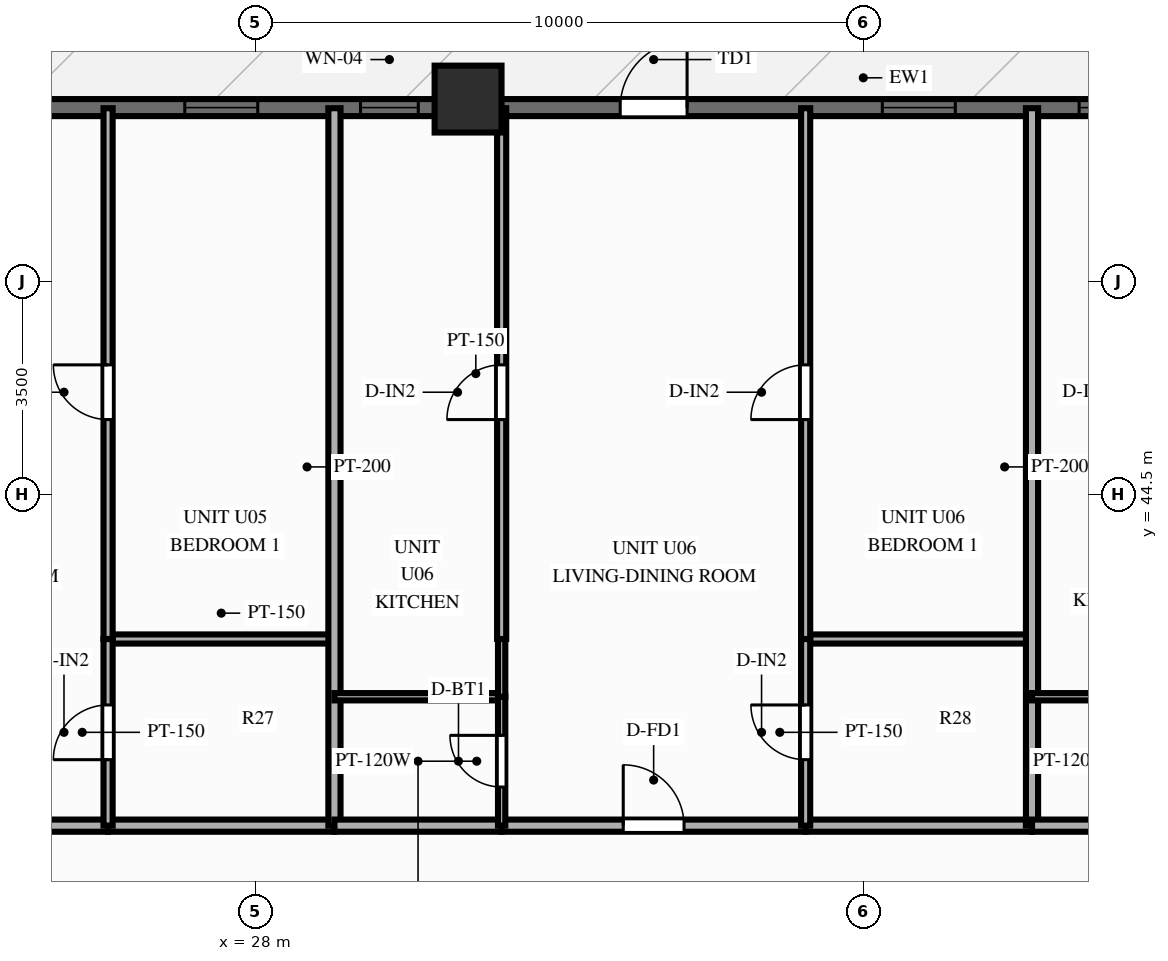
"""IFC4 building model, lengths in metres.
Left out: names, types, materials, properties, quantities, classifications, styles, units other than length and angle.
Written with IfcOpenShell. Run it as: python <this file> out.ifc"""

import sys

from ifc_helpers import new_model, si_unit, direction, frame, frame_2d, origin, origin_2d, place, context, subcontext, project, spatial, rectangle, extrude, source, transform, mapped, element, fill, save


model = new_model("IFC4")
c1 = context("Model", 3, precision=1e-05, world=origin(), true_north=direction((0.0, 1.0)))
c2 = subcontext(c1, "Body", "Model", "MODEL_VIEW")
j1 = project(units=[si_unit("LENGTHUNIT", "METRE"), si_unit("PLANEANGLEUNIT", "RADIAN")], contexts=[c1])
p1 = place(None, origin())
s1 = spatial("IfcSite", under=j1, at=p1, CompositionType="ELEMENT")
p2 = place(p1, origin())
s2 = spatial("IfcBuilding", under=s1, at=p2, CompositionType="ELEMENT")
p3 = place(p2, frame((0.0, 0.0, 43.4)))
s3 = spatial("IfcBuildingStorey", under=s2, at=p3, CompositionType="ELEMENT", Elevation=43.4)
m1 = source(origin(), c2, "Body", "SweptSolid", [
    extrude(rectangle(XDim=1.1, YDim=1.1, at=origin_2d()), origin(), (0.0, 0.0, 1.0), 3.0),
])
p4 = place(p3, frame((31.5, 51.0, 0.0), z_axis=(0.0, 0.0, 1.0), x_axis=(1.0, 0.0, 0.0)))
e1 = element("IfcColumn", 1, at=p4, inside=s3, PredefinedType="COLUMN", context=c2, shape_type="MappedRepresentation", body=[
    mapped(m1, transform((0.0, 0.0, 0.0), scale=1.0)),
])
p5 = place(p3, frame((15.5, 50.86, 0.0), z_axis=(0.0, 0.0, 1.0), x_axis=(1.0, 0.0, 0.0)))
e2 = element("IfcWall", 2, at=p5, inside=s3, PredefinedType="SOLIDWALL", context=c2, shape_type="SweptSolid", body=[
    extrude(rectangle(XDim=45.0, YDim=0.28, at=frame_2d((22.5, 0.0))), origin(), (0.0, 0.0, 1.0), 2.28),
])
p6 = place(p5, frame((0.76, 0.0, 0.25)))
e3 = element("IfcOpeningElement", 3, at=p6, cuts=e2, PredefinedType="OPENING", context=c2, shape_type="SweptSolid", body=[
    extrude(rectangle(XDim=1.2, YDim=1.5, at=frame_2d((0.6, 0.75))), frame((0.0, 0.152, 0.0), z_axis=(0.0, -1.0, 0.0), x_axis=(1.0, 0.0, 0.0)), (0.0, 0.0, 1.0), 0.304),
])
p7 = place(p5, frame((3.105, 0.0, 0.25)))
e4 = element("IfcOpeningElement", 4, at=p7, cuts=e2, PredefinedType="OPENING", context=c2, shape_type="SweptSolid", body=[
    extrude(rectangle(XDim=1.2, YDim=1.5, at=frame_2d((0.6, 0.75))), frame((0.0, 0.152, 0.0), z_axis=(0.0, -1.0, 0.0), x_axis=(1.0, 0.0, 0.0)), (0.0, 0.0, 1.0), 0.304),
])
p8 = place(p5, frame((6.98, 0.0, 0.25)))
e5 = element("IfcOpeningElement", 5, at=p8, cuts=e2, PredefinedType="OPENING", context=c2, shape_type="SweptSolid", body=[
    extrude(rectangle(XDim=1.2, YDim=1.5, at=frame_2d((0.6, 0.75))), frame((0.0, 0.152, 0.0), z_axis=(0.0, -1.0, 0.0), x_axis=(1.0, 0.0, 0.0)), (0.0, 0.0, 1.0), 0.304),
])
p9 = place(p5, frame((11.341, 0.0, 0.25)))
e6 = element("IfcOpeningElement", 6, at=p9, cuts=e2, PredefinedType="OPENING", context=c2, shape_type="SweptSolid", body=[
    extrude(rectangle(XDim=1.2, YDim=1.5, at=frame_2d((0.6, 0.75))), frame((0.0, 0.152, 0.0), z_axis=(0.0, -1.0, 0.0), x_axis=(1.0, 0.0, 0.0)), (0.0, 0.0, 1.0), 0.304),
])
p10 = place(p5, frame((14.231, 0.0, 0.25)))
e7 = element("IfcOpeningElement", 7, at=p10, cuts=e2, PredefinedType="OPENING", context=c2, shape_type="SweptSolid", body=[
    extrude(rectangle(XDim=0.95, YDim=1.5, at=frame_2d((0.475, 0.75))), frame((0.0, 0.152, 0.0), z_axis=(0.0, -1.0, 0.0), x_axis=(1.0, 0.0, 0.0)), (0.0, 0.0, 1.0), 0.304),
])
p11 = place(p5, frame((18.502, 0.0, 0.0)))
e8 = element("IfcOpeningElement", 8, at=p11, cuts=e2, PredefinedType="OPENING", context=c2, shape_type="SweptSolid", body=[
    extrude(rectangle(XDim=1.1, YDim=2.15, at=frame_2d((0.55, 1.075))), frame((0.0, 0.152, 0.0), z_axis=(0.0, -1.0, 0.0), x_axis=(1.0, 0.0, 0.0)), (0.0, 0.0, 1.0), 0.304),
])
p12 = place(p5, frame((22.813, 0.0, 0.25)))
e9 = element("IfcOpeningElement", 9, at=p12, cuts=e2, PredefinedType="OPENING", context=c2, shape_type="SweptSolid", body=[
    extrude(rectangle(XDim=1.2, YDim=1.5, at=frame_2d((0.6, 0.75))), frame((0.0, 0.152, 0.0), z_axis=(0.0, -1.0, 0.0), x_axis=(1.0, 0.0, 0.0)), (0.0, 0.0, 1.0), 0.304),
])
p13 = place(p5, frame((26.05, 0.0, 0.25)))
e10 = element("IfcOpeningElement", 10, at=p13, cuts=e2, PredefinedType="OPENING", context=c2, shape_type="SweptSolid", body=[
    extrude(rectangle(XDim=1.2, YDim=1.5, at=frame_2d((0.6, 0.75))), frame((0.0, 0.152, 0.0), z_axis=(0.0, -1.0, 0.0), x_axis=(1.0, 0.0, 0.0)), (0.0, 0.0, 1.0), 0.304),
])
p14 = place(p5, frame((29.97, 0.0, 0.25)))
e11 = element("IfcOpeningElement", 11, at=p14, cuts=e2, PredefinedType="OPENING", context=c2, shape_type="SweptSolid", body=[
    extrude(rectangle(XDim=1.2, YDim=1.5, at=frame_2d((0.6, 0.75))), frame((0.0, 0.152, 0.0), z_axis=(0.0, -1.0, 0.0), x_axis=(1.0, 0.0, 0.0)), (0.0, 0.0, 1.0), 0.304),
])
p15 = place(p5, frame((33.011, 0.0, 0.25)))
e12 = element("IfcOpeningElement", 12, at=p15, cuts=e2, PredefinedType="OPENING", context=c2, shape_type="SweptSolid", body=[
    extrude(rectangle(XDim=1.2, YDim=1.5, at=frame_2d((0.6, 0.75))), frame((0.0, 0.152, 0.0), z_axis=(0.0, -1.0, 0.0), x_axis=(1.0, 0.0, 0.0)), (0.0, 0.0, 1.0), 0.304),
])
p16 = place(p5, frame((36.181, 0.0, 0.25)))
e13 = element("IfcOpeningElement", 13, at=p16, cuts=e2, PredefinedType="OPENING", context=c2, shape_type="SweptSolid", body=[
    extrude(rectangle(XDim=1.2, YDim=1.5, at=frame_2d((0.6, 0.75))), frame((0.0, 0.152, 0.0), z_axis=(0.0, -1.0, 0.0), x_axis=(1.0, 0.0, 0.0)), (0.0, 0.0, 1.0), 0.304),
])
p17 = place(p5, frame((39.079, 0.0, 0.25)))
e14 = element("IfcOpeningElement", 14, at=p17, cuts=e2, PredefinedType="OPENING", context=c2, shape_type="SweptSolid", body=[
    extrude(rectangle(XDim=1.2, YDim=1.5, at=frame_2d((0.6, 0.75))), frame((0.0, 0.152, 0.0), z_axis=(0.0, -1.0, 0.0), x_axis=(1.0, 0.0, 0.0)), (0.0, 0.0, 1.0), 0.304),
])
p18 = place(p5, frame((42.339, 0.0, 0.25)))
e15 = element("IfcOpeningElement", 15, at=p18, cuts=e2, PredefinedType="OPENING", context=c2, shape_type="SweptSolid", body=[
    extrude(rectangle(XDim=1.2, YDim=1.5, at=frame_2d((0.6, 0.75))), frame((0.0, 0.152, 0.0), z_axis=(0.0, -1.0, 0.0), x_axis=(1.0, 0.0, 0.0)), (0.0, 0.0, 1.0), 0.304),
])
p19 = place(p3, frame((20.58, 39.05, 0.0), z_axis=(0.0, 0.0, 1.0), x_axis=(1.0, 0.0, 0.0)))
e16 = element("IfcWall", 16, at=p19, inside=s3, PredefinedType="PARTITIONING", context=c2, shape_type="SweptSolid", body=[
    extrude(rectangle(XDim=5.0, YDim=0.2, at=frame_2d((2.5, 0.0))), origin(), (0.0, 0.0, 1.0), 2.79),
])
p20 = place(p19, frame((2.0, 0.0, 0.0)))
e17 = element("IfcOpeningElement", 17, at=p20, cuts=e16, PredefinedType="OPENING", context=c2, shape_type="SweptSolid", body=[
    extrude(rectangle(XDim=1.0, YDim=2.15, at=frame_2d((0.5, 1.075))), frame((0.0, 0.112, 0.0), z_axis=(0.0, -1.0, 0.0), x_axis=(1.0, 0.0, 0.0)), (0.0, 0.0, 1.0), 0.224),
])
p21 = place(p3, frame((25.58, 39.05, 0.0), z_axis=(0.0, 0.0, 1.0), x_axis=(1.0, 0.0, 0.0)))
e18 = element("IfcWall", 18, at=p21, inside=s3, PredefinedType="PARTITIONING", context=c2, shape_type="SweptSolid", body=[
    extrude(rectangle(XDim=3.723, YDim=0.2, at=frame_2d((1.861, 0.0))), origin(), (0.0, 0.0, 1.0), 2.79),
])
p22 = place(p3, frame((25.58, 42.12, 0.0), z_axis=(0.0, 0.0, 1.0), x_axis=(1.0, 0.0, 0.0)))
e19 = element("IfcWall", 19, at=p22, inside=s3, PredefinedType="PARTITIONING", context=c2, shape_type="SweptSolid", body=[
    extrude(rectangle(XDim=3.723, YDim=0.15, at=frame_2d((1.861, 0.0))), origin(), (0.0, 0.0, 1.0), 2.79),
])
p23 = place(p3, frame((25.58, 39.05, 0.0), z_axis=(0.0, 0.0, 1.0), x_axis=(0.0, 1.0, 0.0)))
e20 = element("IfcWall", 20, at=p23, inside=s3, PredefinedType="PARTITIONING", context=c2, shape_type="SweptSolid", body=[
    extrude(rectangle(XDim=3.07, YDim=0.15, at=frame_2d((1.535, 0.0))), origin(), (0.0, 0.0, 1.0), 2.79),
])
p24 = place(p23, frame((1.085, 0.0, 0.0)))
e21 = element("IfcOpeningElement", 21, at=p24, cuts=e20, PredefinedType="OPENING", context=c2, shape_type="SweptSolid", body=[
    extrude(rectangle(XDim=0.9, YDim=2.1, at=frame_2d((0.45, 1.05))), frame((0.0, 0.087, 0.0), z_axis=(0.0, -1.0, 0.0), x_axis=(1.0, 0.0, 0.0)), (0.0, 0.0, 1.0), 0.174),
])
p25 = place(p3, frame((25.58, 42.12, 0.0), z_axis=(0.0, 0.0, 1.0), x_axis=(0.0, 1.0, 0.0)))
e22 = element("IfcWall", 22, at=p25, inside=s3, PredefinedType="PARTITIONING", context=c2, shape_type="SweptSolid", body=[
    extrude(rectangle(XDim=8.73, YDim=0.15, at=frame_2d((4.365, 0.0))), origin(), (0.0, 0.0, 1.0), 2.79),
])
p26 = place(p25, frame((3.609, 0.0, 0.0)))
e23 = element("IfcOpeningElement", 23, at=p26, cuts=e22, PredefinedType="OPENING", context=c2, shape_type="SweptSolid", body=[
    extrude(rectangle(XDim=0.9, YDim=2.1, at=frame_2d((0.45, 1.05))), frame((0.0, 0.087, 0.0), z_axis=(0.0, -1.0, 0.0), x_axis=(1.0, 0.0, 0.0)), (0.0, 0.0, 1.0), 0.174),
])
p27 = place(p3, frame((29.302, 39.05, 0.0), z_axis=(0.0, 0.0, 1.0), x_axis=(0.0, 1.0, 0.0)))
e24 = element("IfcWall", 24, at=p27, inside=s3, PredefinedType="PARTITIONING", context=c2, shape_type="SweptSolid", body=[
    extrude(rectangle(XDim=11.8, YDim=0.2, at=frame_2d((5.9, 0.0))), origin(), (0.0, 0.0, 1.0), 2.79),
])
p28 = place(p3, frame((29.302, 39.05, 0.0), z_axis=(0.0, 0.0, 1.0), x_axis=(1.0, 0.0, 0.0)))
e25 = element("IfcWall", 25, at=p28, inside=s3, PredefinedType="PARTITIONING", context=c2, shape_type="SweptSolid", body=[
    extrude(rectangle(XDim=2.75, YDim=0.2, at=frame_2d((1.375, 0.0))), origin(), (0.0, 0.0, 1.0), 2.79),
])
p29 = place(p3, frame((32.052, 39.05, 0.0), z_axis=(0.0, 0.0, 1.0), x_axis=(1.0, 0.0, 0.0)))
e26 = element("IfcWall", 26, at=p29, inside=s3, PredefinedType="PARTITIONING", context=c2, shape_type="SweptSolid", body=[
    extrude(rectangle(XDim=5.0, YDim=0.2, at=frame_2d((2.5, 0.0))), origin(), (0.0, 0.0, 1.0), 2.79),
])
p30 = place(p29, frame((2.0, 0.0, 0.0)))
e27 = element("IfcOpeningElement", 27, at=p30, cuts=e26, PredefinedType="OPENING", context=c2, shape_type="SweptSolid", body=[
    extrude(rectangle(XDim=1.0, YDim=2.15, at=frame_2d((0.5, 1.075))), frame((0.0, 0.112, 0.0), z_axis=(0.0, -1.0, 0.0), x_axis=(1.0, 0.0, 0.0)), (0.0, 0.0, 1.0), 0.224),
])
p31 = place(p3, frame((37.052, 39.05, 0.0), z_axis=(0.0, 0.0, 1.0), x_axis=(1.0, 0.0, 0.0)))
e28 = element("IfcWall", 28, at=p31, inside=s3, PredefinedType="PARTITIONING", context=c2, shape_type="SweptSolid", body=[
    extrude(rectangle(XDim=3.723, YDim=0.2, at=frame_2d((1.861, 0.0))), origin(), (0.0, 0.0, 1.0), 2.79),
])
p32 = place(p3, frame((29.302, 41.17, 0.0), z_axis=(0.0, 0.0, 1.0), x_axis=(1.0, 0.0, 0.0)))
e29 = element("IfcWall", 29, at=p32, inside=s3, PredefinedType="PARTITIONING", context=c2, shape_type="SweptSolid", body=[
    extrude(rectangle(XDim=2.75, YDim=0.12, at=frame_2d((1.375, 0.0))), origin(), (0.0, 0.0, 1.0), 2.79),
])
p33 = place(p3, frame((37.052, 42.12, 0.0), z_axis=(0.0, 0.0, 1.0), x_axis=(1.0, 0.0, 0.0)))
e30 = element("IfcWall", 30, at=p33, inside=s3, PredefinedType="PARTITIONING", context=c2, shape_type="SweptSolid", body=[
    extrude(rectangle(XDim=3.723, YDim=0.15, at=frame_2d((1.861, 0.0))), origin(), (0.0, 0.0, 1.0), 2.79),
])
p34 = place(p3, frame((32.052, 39.05, 0.0), z_axis=(0.0, 0.0, 1.0), x_axis=(0.0, 1.0, 0.0)))
e31 = element("IfcWall", 31, at=p34, inside=s3, PredefinedType="PARTITIONING", context=c2, shape_type="SweptSolid", body=[
    extrude(rectangle(XDim=2.12, YDim=0.12, at=frame_2d((1.06, 0.0))), origin(), (0.0, 0.0, 1.0), 2.79),
])
p35 = place(p34, frame((0.635, 0.0, 0.0)))
e32 = element("IfcOpeningElement", 32, at=p35, cuts=e31, PredefinedType="OPENING", context=c2, shape_type="SweptSolid", body=[
    extrude(rectangle(XDim=0.85, YDim=2.05, at=frame_2d((0.425, 1.025))), frame((0.0, 0.072, 0.0), z_axis=(0.0, -1.0, 0.0), x_axis=(1.0, 0.0, 0.0)), (0.0, 0.0, 1.0), 0.144),
])
p36 = place(p3, frame((32.052, 41.17, 0.0), z_axis=(0.0, 0.0, 1.0), x_axis=(0.0, 1.0, 0.0)))
e33 = element("IfcWall", 33, at=p36, inside=s3, PredefinedType="PARTITIONING", context=c2, shape_type="SweptSolid", body=[
    extrude(rectangle(XDim=0.95, YDim=0.12, at=frame_2d((0.475, 0.0))), origin(), (0.0, 0.0, 1.0), 2.79),
])
p37 = place(p3, frame((32.052, 42.12, 0.0), z_axis=(0.0, 0.0, 1.0), x_axis=(0.0, 1.0, 0.0)))
e34 = element("IfcWall", 34, at=p37, inside=s3, PredefinedType="PARTITIONING", context=c2, shape_type="SweptSolid", body=[
    extrude(rectangle(XDim=8.73, YDim=0.15, at=frame_2d((4.365, 0.0))), origin(), (0.0, 0.0, 1.0), 2.79),
])
p38 = place(p37, frame((3.609, 0.0, 0.0)))
e35 = element("IfcOpeningElement", 35, at=p38, cuts=e34, PredefinedType="OPENING", context=c2, shape_type="SweptSolid", body=[
    extrude(rectangle(XDim=0.9, YDim=2.1, at=frame_2d((0.45, 1.05))), frame((0.0, 0.087, 0.0), z_axis=(0.0, -1.0, 0.0), x_axis=(1.0, 0.0, 0.0)), (0.0, 0.0, 1.0), 0.174),
])
p39 = place(p3, frame((37.052, 39.05, 0.0), z_axis=(0.0, 0.0, 1.0), x_axis=(0.0, 1.0, 0.0)))
e36 = element("IfcWall", 36, at=p39, inside=s3, PredefinedType="PARTITIONING", context=c2, shape_type="SweptSolid", body=[
    extrude(rectangle(XDim=3.07, YDim=0.15, at=frame_2d((1.535, 0.0))), origin(), (0.0, 0.0, 1.0), 2.79),
])
p40 = place(p39, frame((1.085, 0.0, 0.0)))
e37 = element("IfcOpeningElement", 37, at=p40, cuts=e36, PredefinedType="OPENING", context=c2, shape_type="SweptSolid", body=[
    extrude(rectangle(XDim=0.9, YDim=2.1, at=frame_2d((0.45, 1.05))), frame((0.0, 0.087, 0.0), z_axis=(0.0, -1.0, 0.0), x_axis=(1.0, 0.0, 0.0)), (0.0, 0.0, 1.0), 0.174),
])
p41 = place(p3, frame((37.052, 42.12, 0.0), z_axis=(0.0, 0.0, 1.0), x_axis=(0.0, 1.0, 0.0)))
e38 = element("IfcWall", 38, at=p41, inside=s3, PredefinedType="PARTITIONING", context=c2, shape_type="SweptSolid", body=[
    extrude(rectangle(XDim=8.73, YDim=0.15, at=frame_2d((4.365, 0.0))), origin(), (0.0, 0.0, 1.0), 2.79),
])
p42 = place(p41, frame((3.609, 0.0, 0.0)))
e39 = element("IfcOpeningElement", 39, at=p42, cuts=e38, PredefinedType="OPENING", context=c2, shape_type="SweptSolid", body=[
    extrude(rectangle(XDim=0.9, YDim=2.1, at=frame_2d((0.45, 1.05))), frame((0.0, 0.087, 0.0), z_axis=(0.0, -1.0, 0.0), x_axis=(1.0, 0.0, 0.0)), (0.0, 0.0, 1.0), 0.174),
])
p43 = place(p3, frame((40.775, 39.05, 0.0), z_axis=(0.0, 0.0, 1.0), x_axis=(0.0, 1.0, 0.0)))
e40 = element("IfcWall", 40, at=p43, inside=s3, PredefinedType="PARTITIONING", context=c2, shape_type="SweptSolid", body=[
    extrude(rectangle(XDim=11.8, YDim=0.2, at=frame_2d((5.9, 0.0))), origin(), (0.0, 0.0, 1.0), 2.79),
])
p44 = place(p3, frame((40.775, 39.05, 0.0), z_axis=(0.0, 0.0, 1.0), x_axis=(1.0, 0.0, 0.0)))
e41 = element("IfcWall", 41, at=p44, inside=s3, PredefinedType="PARTITIONING", context=c2, shape_type="SweptSolid", body=[
    extrude(rectangle(XDim=2.75, YDim=0.2, at=frame_2d((1.375, 0.0))), origin(), (0.0, 0.0, 1.0), 2.79),
])
p45 = place(p3, frame((40.775, 41.17, 0.0), z_axis=(0.0, 0.0, 1.0), x_axis=(1.0, 0.0, 0.0)))
e42 = element("IfcWall", 42, at=p45, inside=s3, PredefinedType="PARTITIONING", context=c2, shape_type="SweptSolid", body=[
    extrude(rectangle(XDim=2.75, YDim=0.12, at=frame_2d((1.375, 0.0))), origin(), (0.0, 0.0, 1.0), 2.79),
])
m2 = source(origin(), c2, "Body", "SweptSolid", [
    extrude(rectangle(XDim=1.2, YDim=1.5, at=frame_2d((0.6, 0.75))), frame((0.0, 0.03, 0.0), z_axis=(0.0, -1.0, 0.0), x_axis=(1.0, 0.0, 0.0)), (0.0, 0.0, 1.0), 0.06),
])
p46 = place(p9, origin())
e43 = element("IfcWindow", 43, at=p46, inside=s3, PartitioningType="SINGLE_PANEL", PredefinedType="WINDOW", context=c2, shape_type="MappedRepresentation", body=[
    mapped(m2, transform((0.0, 0.0, 0.0), scale=1.0)),
])
fill(e6, e43)
m3 = source(origin(), c2, "Body", "SweptSolid", [
    extrude(rectangle(XDim=0.95, YDim=1.5, at=frame_2d((0.475, 0.75))), frame((0.0, 0.03, 0.0), z_axis=(0.0, -1.0, 0.0), x_axis=(1.0, 0.0, 0.0)), (0.0, 0.0, 1.0), 0.06),
])
p47 = place(p10, origin())
e44 = element("IfcWindow", 44, at=p47, inside=s3, PartitioningType="SINGLE_PANEL", PredefinedType="WINDOW", context=c2, shape_type="MappedRepresentation", body=[
    mapped(m3, transform((0.0, 0.0, 0.0), scale=1.0)),
])
fill(e7, e44)
m4 = source(origin(), c2, "Body", "SweptSolid", [
    extrude(rectangle(XDim=1.1, YDim=2.15, at=frame_2d((0.55, 1.075))), frame((0.0, 0.025, 0.0), z_axis=(0.0, -1.0, 0.0), x_axis=(1.0, 0.0, 0.0)), (0.0, 0.0, 1.0), 0.05),
])
p48 = place(p11, origin())
e45 = element("IfcDoor", 45, at=p48, inside=s3, OperationType="SINGLE_SWING_RIGHT", PredefinedType="DOOR", context=c2, shape_type="MappedRepresentation", body=[
    mapped(m4, transform((0.0, 0.0, 0.0), scale=1.0)),
])
fill(e8, e45)
p49 = place(p12, origin())
e46 = element("IfcWindow", 46, at=p49, inside=s3, PartitioningType="SINGLE_PANEL", PredefinedType="WINDOW", context=c2, shape_type="MappedRepresentation", body=[
    mapped(m2, transform((0.0, 0.0, 0.0), scale=1.0)),
])
fill(e9, e46)
p50 = place(p13, origin())
e47 = element("IfcWindow", 47, at=p50, inside=s3, PartitioningType="SINGLE_PANEL", PredefinedType="WINDOW", context=c2, shape_type="MappedRepresentation", body=[
    mapped(m2, transform((0.0, 0.0, 0.0), scale=1.0)),
])
fill(e10, e47)
m5 = source(origin(), c2, "Body", "SweptSolid", [
    extrude(rectangle(XDim=0.9, YDim=2.1, at=frame_2d((0.45, 1.05))), frame((0.0, 0.025, 0.0), z_axis=(0.0, -1.0, 0.0), x_axis=(1.0, 0.0, 0.0)), (0.0, 0.0, 1.0), 0.05),
])
p51 = place(p24, origin())
e48 = element("IfcDoor", 48, at=p51, inside=s3, OperationType="SINGLE_SWING_LEFT", PredefinedType="DOOR", context=c2, shape_type="MappedRepresentation", body=[
    mapped(m5, transform((0.0, 0.0, 0.0), scale=1.0)),
])
fill(e21, e48)
p52 = place(p26, origin())
e49 = element("IfcDoor", 49, at=p52, inside=s3, OperationType="SINGLE_SWING_RIGHT", PredefinedType="DOOR", context=c2, shape_type="MappedRepresentation", body=[
    mapped(m5, transform((0.0, 0.0, 0.0), scale=1.0)),
])
fill(e23, e49)
m6 = source(origin(), c2, "Body", "SweptSolid", [
    extrude(rectangle(XDim=1.0, YDim=2.15, at=frame_2d((0.5, 1.075))), frame((0.0, 0.025, 0.0), z_axis=(0.0, -1.0, 0.0), x_axis=(1.0, 0.0, 0.0)), (0.0, 0.0, 1.0), 0.05),
])
p53 = place(p30, origin())
e50 = element("IfcDoor", 50, at=p53, inside=s3, OperationType="SINGLE_SWING_LEFT", PredefinedType="DOOR", context=c2, shape_type="MappedRepresentation", body=[
    mapped(m6, transform((0.0, 0.0, 0.0), scale=1.0)),
])
fill(e27, e50)
m7 = source(origin(), c2, "Body", "SweptSolid", [
    extrude(rectangle(XDim=0.85, YDim=2.05, at=frame_2d((0.425, 1.025))), frame((0.0, 0.025, 0.0), z_axis=(0.0, -1.0, 0.0), x_axis=(1.0, 0.0, 0.0)), (0.0, 0.0, 1.0), 0.05),
])
p54 = place(p35, origin())
e51 = element("IfcDoor", 51, at=p54, inside=s3, OperationType="SINGLE_SWING_RIGHT", PredefinedType="DOOR", context=c2, shape_type="MappedRepresentation", body=[
    mapped(m7, transform((0.0, 0.0, 0.0), scale=1.0)),
])
fill(e32, e51)
p55 = place(p38, origin())
e52 = element("IfcDoor", 52, at=p55, inside=s3, OperationType="SINGLE_SWING_LEFT", PredefinedType="DOOR", context=c2, shape_type="MappedRepresentation", body=[
    mapped(m5, transform((0.0, 0.0, 0.0), scale=1.0)),
])
fill(e35, e52)
p56 = place(p40, origin())
e53 = element("IfcDoor", 53, at=p56, inside=s3, OperationType="SINGLE_SWING_RIGHT", PredefinedType="DOOR", context=c2, shape_type="MappedRepresentation", body=[
    mapped(m5, transform((0.0, 0.0, 0.0), scale=1.0)),
])
fill(e37, e53)
p57 = place(p42, origin())
e54 = element("IfcDoor", 54, at=p57, inside=s3, OperationType="SINGLE_SWING_LEFT", PredefinedType="DOOR", context=c2, shape_type="MappedRepresentation", body=[
    mapped(m5, transform((0.0, 0.0, 0.0), scale=1.0)),
])
fill(e39, e54)
save(model, sys.argv[1])
